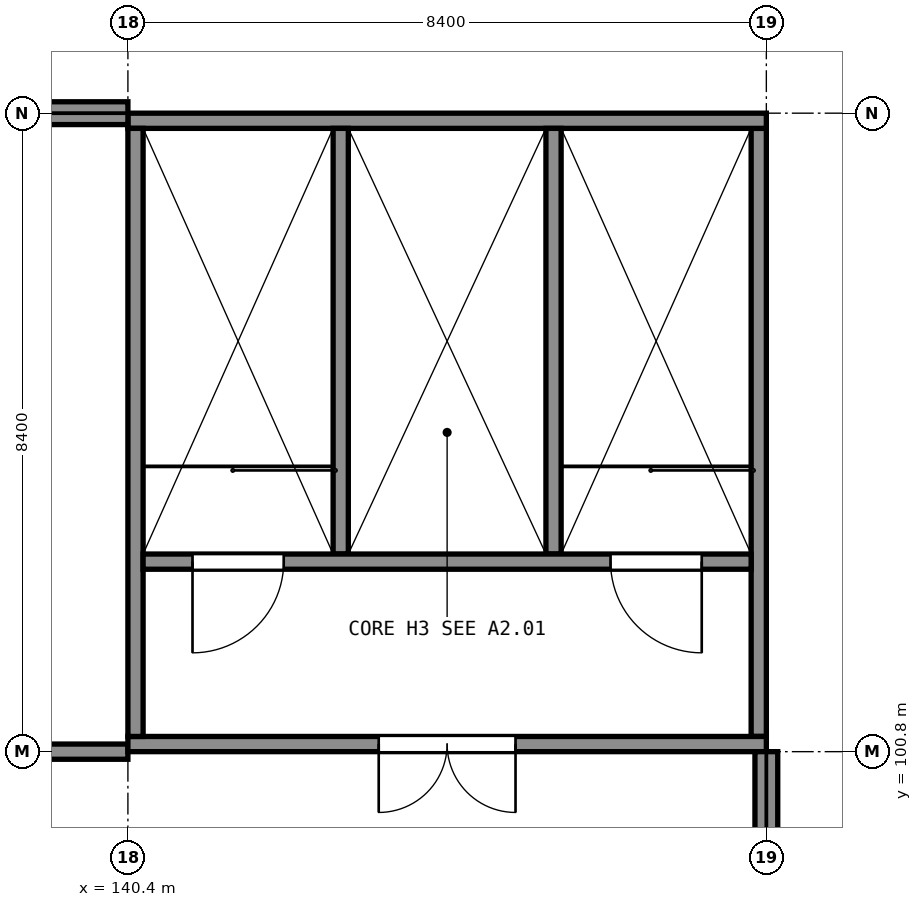
"""IFC4 building model, lengths in metres.
Left out: names, types, materials, properties, quantities, classifications, styles, units other than length and angle.
Written with IfcOpenShell. Run it as: python <this file> out.ifc"""

import sys

from ifc_helpers import new_model, si_unit, direction, frame, frame_2d, origin, place, context, subcontext, project, spatial, polyline, rectangle, outline, extrude, element, fill, save


model = new_model("IFC4")
c1 = context("Model", 3, precision=1e-05, world=origin(), true_north=direction((0.0, 1.0)))
c2 = subcontext(c1, "Body", "Model", "MODEL_VIEW")
j1 = project(units=[si_unit("LENGTHUNIT", "METRE"), si_unit("PLANEANGLEUNIT", "RADIAN")], contexts=[c1])
p1 = place(None, origin())
s1 = spatial("IfcSite", under=j1, at=p1, CompositionType="ELEMENT")
p2 = place(p1, origin())
s2 = spatial("IfcBuilding", under=s1, at=p2, CompositionType="ELEMENT")
p3 = place(p2, frame((0.0, 0.0, 25.0)))
s3 = spatial("IfcBuildingStorey", under=s2, at=p3, CompositionType="ELEMENT", Elevation=25.0)
p4 = place(p3, frame((140.4, 100.9, 0.0), z_axis=(0.0, 0.0, 1.0), x_axis=(1.0, 0.0, 0.0)))
e1 = element("IfcWall", 1, at=p4, inside=s3, PredefinedType="SHEAR", context=c2, shape_type="SweptSolid", body=[
    extrude(rectangle(XDim=8.4, YDim=0.2, at=frame_2d((4.2, 0.0))), origin(), (0.0, 0.0, 1.0), 23.29),
])
p5 = place(p4, frame((3.3, 0.0, 0.0)))
e2 = element("IfcOpeningElement", 2, at=p5, cuts=e1, PredefinedType="OPENING", context=c2, shape_type="SweptSolid", body=[
    extrude(rectangle(XDim=1.8, YDim=2.1, at=frame_2d((0.9, 1.05))), frame((0.0, 0.11, 0.0), z_axis=(0.0, -1.0, 0.0), x_axis=(1.0, 0.0, 0.0)), (0.0, 0.0, 1.0), 0.22),
])
p6 = place(p3, frame((140.4, 109.1, 0.0), z_axis=(0.0, 0.0, 1.0), x_axis=(1.0, 0.0, 0.0)))
e3 = element("IfcWall", 3, at=p6, inside=s3, PredefinedType="SHEAR", context=c2, shape_type="SweptSolid", body=[
    extrude(rectangle(XDim=8.4, YDim=0.2, at=frame_2d((4.2, 0.0))), origin(), (0.0, 0.0, 1.0), 23.29),
])
for number, where, z_axis, x_axis in (
    (4, (140.5, 101.0, 0.0), (0.0, 0.0, 1.0), (0.0, 1.0, 0.0)),
    (5, (148.7, 101.0, 0.0), (0.0, 0.0, 1.0), (0.0, 1.0, 0.0)),
):
    element("IfcWall", number, at=place(p3, frame(where, z_axis=z_axis, x_axis=x_axis)), inside=s3, PredefinedType="SHEAR", context=c2, shape_type="SweptSolid", body=[
        extrude(rectangle(XDim=8.0, YDim=0.2, at=frame_2d((4.0, 0.0))), origin(), (0.0, 0.0, 1.0), 23.29),
    ])
p7 = place(p3, frame((140.6, 103.3, 0.0), z_axis=(0.0, 0.0, 1.0), x_axis=(1.0, 0.0, 0.0)))
e6 = element("IfcWall", 6, at=p7, inside=s3, PredefinedType="SHEAR", context=c2, shape_type="SweptSolid", body=[
    extrude(rectangle(XDim=8.0, YDim=0.2, at=frame_2d((4.0, 0.0))), origin(), (0.0, 0.0, 1.0), 23.29),
])
p8 = place(p7, frame((0.65, 0.0, 0.0)))
e7 = element("IfcOpeningElement", 7, at=p8, cuts=e6, PredefinedType="OPENING", context=c2, shape_type="SweptSolid", body=[
    extrude(rectangle(XDim=1.2, YDim=2.1, at=frame_2d((0.6, 1.05))), frame((0.0, 0.11, 0.0), z_axis=(0.0, -1.0, 0.0), x_axis=(1.0, 0.0, 0.0)), (0.0, 0.0, 1.0), 0.22),
])
p9 = place(p7, frame((6.15, 0.0, 0.0)))
e8 = element("IfcOpeningElement", 8, at=p9, cuts=e6, PredefinedType="OPENING", context=c2, shape_type="SweptSolid", body=[
    extrude(rectangle(XDim=1.2, YDim=2.1, at=frame_2d((0.6, 1.05))), frame((0.0, 0.11, 0.0), z_axis=(0.0, -1.0, 0.0), x_axis=(1.0, 0.0, 0.0)), (0.0, 0.0, 1.0), 0.22),
])
for number, where, z_axis, x_axis in (
    (9, (143.2, 103.4, 0.0), (0.0, 0.0, 1.0), (0.0, 1.0, 0.0)),
    (10, (146.0, 103.4, 0.0), (0.0, 0.0, 1.0), (0.0, 1.0, 0.0)),
):
    element("IfcWall", number, at=place(p3, frame(where, z_axis=z_axis, x_axis=x_axis)), inside=s3, PredefinedType="SHEAR", context=c2, shape_type="SweptSolid", body=[
        extrude(rectangle(XDim=5.6, YDim=0.2, at=frame_2d((2.8, 0.0))), origin(), (0.0, 0.0, 1.0), 23.29),
    ])
p10 = place(p3, frame((148.8, 92.7, 0.0), z_axis=(0.0, 0.0, 1.0), x_axis=(0.0, 1.0, 0.0)))
e11 = element("IfcWall", 11, at=p10, inside=s3, PredefinedType="SOLIDWALL", context=c2, shape_type="SweptSolid", body=[
    extrude(outline(polyline([(0.0, 0.0), (8.1, 0.0), (8.1, 18.94), (0.0, 18.293), (0.0, 0.0)])), frame((0.0, 0.15, 0.0), z_axis=(0.0, -1.0, 0.0), x_axis=(1.0, 0.0, 0.0)), (0.0, 0.0, 1.0), 0.3),
])
p11 = place(p10, frame((2.35, 0.0, 1.5)))
e12 = element("IfcOpeningElement", 12, at=p11, cuts=e11, PredefinedType="OPENING", context=c2, shape_type="SweptSolid", body=[
    extrude(rectangle(XDim=0.6, YDim=2.4, at=frame_2d((0.3, 1.2))), frame((0.0, 0.16, 0.0), z_axis=(0.0, -1.0, 0.0), x_axis=(1.0, 0.0, 0.0)), (0.0, 0.0, 1.0), 0.32),
])
p12 = place(p10, frame((5.15, 0.0, 1.5)))
e13 = element("IfcOpeningElement", 13, at=p12, cuts=e11, PredefinedType="OPENING", context=c2, shape_type="SweptSolid", body=[
    extrude(rectangle(XDim=0.6, YDim=2.4, at=frame_2d((0.3, 1.2))), frame((0.0, 0.16, 0.0), z_axis=(0.0, -1.0, 0.0), x_axis=(1.0, 0.0, 0.0)), (0.0, 0.0, 1.0), 0.32),
])
p13 = place(p3, frame((132.0, 109.2, 0.0), z_axis=(0.0, 0.0, 1.0), x_axis=(1.0, 0.0, 0.0)))
e14 = element("IfcWall", 14, at=p13, inside=s3, PredefinedType="SOLIDWALL", context=c2, shape_type="SweptSolid", body=[
    extrude(rectangle(XDim=8.4, YDim=0.3, at=frame_2d((4.2, 0.0))), origin(), (0.0, 0.0, 1.0), 11.9),
])
p14 = place(p13, frame((2.5, 0.0, 1.5)))
e15 = element("IfcOpeningElement", 15, at=p14, cuts=e14, PredefinedType="OPENING", context=c2, shape_type="SweptSolid", body=[
    extrude(rectangle(XDim=0.6, YDim=2.4, at=frame_2d((0.3, 1.2))), frame((0.0, 0.16, 0.0), z_axis=(0.0, -1.0, 0.0), x_axis=(1.0, 0.0, 0.0)), (0.0, 0.0, 1.0), 0.32),
])
p15 = place(p13, frame((5.3, 0.0, 1.5)))
e16 = element("IfcOpeningElement", 16, at=p15, cuts=e14, PredefinedType="OPENING", context=c2, shape_type="SweptSolid", body=[
    extrude(rectangle(XDim=0.6, YDim=2.4, at=frame_2d((0.3, 1.2))), frame((0.0, 0.16, 0.0), z_axis=(0.0, -1.0, 0.0), x_axis=(1.0, 0.0, 0.0)), (0.0, 0.0, 1.0), 0.32),
])
p16 = place(p3, frame((132.0, 100.8, 0.0), z_axis=(0.0, 0.0, 1.0), x_axis=(1.0, 0.0, 0.0)))
e17 = element("IfcWall", 17, at=p16, inside=s3, PredefinedType="PARTITIONING", context=c2, shape_type="SweptSolid", body=[
    extrude(rectangle(XDim=8.4, YDim=0.2, at=frame_2d((4.2, 0.0))), origin(), (0.0, 0.0, 1.0), 17.27),
])
p17 = place(p16, frame((4.975, 0.0, 0.0)))
e18 = element("IfcOpeningElement", 18, at=p17, cuts=e17, PredefinedType="OPENING", context=c2, shape_type="SweptSolid", body=[
    extrude(rectangle(XDim=2.4, YDim=2.4, at=frame_2d((1.2, 1.2))), frame((0.0, 0.11, 0.0), z_axis=(0.0, -1.0, 0.0), x_axis=(1.0, 0.0, 0.0)), (0.0, 0.0, 1.0), 0.22),
])
p18 = place(p5, origin())
e19 = element("IfcDoor", 19, at=p18, inside=s3, OperationType="DOUBLE_DOOR_SINGLE_SWING", PredefinedType="DOOR", context=c2, shape_type="SweptSolid", body=[
    extrude(rectangle(XDim=1.8, YDim=2.1, at=frame_2d((0.9, 1.05))), frame((0.0, 0.025, 0.0), z_axis=(0.0, -1.0, 0.0), x_axis=(1.0, 0.0, 0.0)), (0.0, 0.0, 1.0), 0.05),
])
fill(e2, e19)
p19 = place(p8, origin())
e20 = element("IfcDoor", 20, at=p19, inside=s3, OperationType="SINGLE_SWING_LEFT", PredefinedType="DOOR", context=c2, shape_type="SweptSolid", body=[
    extrude(rectangle(XDim=1.2, YDim=2.1, at=frame_2d((0.6, 1.05))), frame((0.0, 0.025, 0.0), z_axis=(0.0, -1.0, 0.0), x_axis=(1.0, 0.0, 0.0)), (0.0, 0.0, 1.0), 0.05),
])
fill(e7, e20)
p20 = place(p9, origin())
e21 = element("IfcDoor", 21, at=p20, inside=s3, OperationType="SINGLE_SWING_RIGHT", PredefinedType="DOOR", context=c2, shape_type="SweptSolid", body=[
    extrude(rectangle(XDim=1.2, YDim=2.1, at=frame_2d((0.6, 1.05))), frame((0.0, 0.025, 0.0), z_axis=(0.0, -1.0, 0.0), x_axis=(1.0, 0.0, 0.0)), (0.0, 0.0, 1.0), 0.05),
])
fill(e8, e21)
save(model, sys.argv[1])
